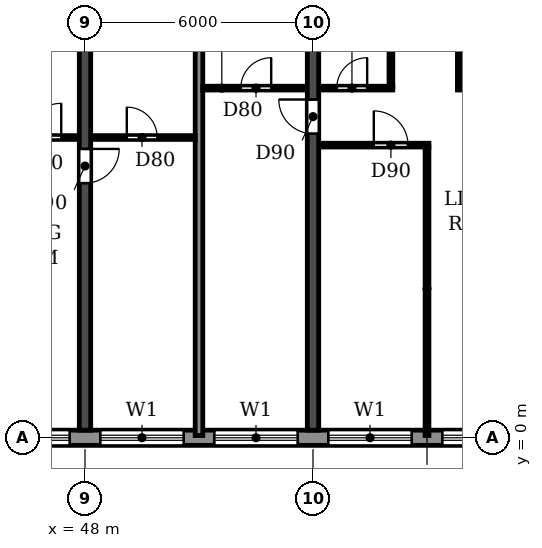
"""IFC4 building model, lengths in metres.
Left out: names, types, materials, properties, quantities, classifications, styles, units other than length and angle.
Written with IfcOpenShell. Run it as: python <this file> out.ifc"""

import sys

from ifc_helpers import new_model, si_unit, direction, frame, frame_2d, origin, place, context, subcontext, project, spatial, rectangle, extrude, element, fill, save


model = new_model("IFC4")
c1 = context("Model", 3, precision=1e-05, world=origin(), true_north=direction((0.0, 1.0)))
c2 = subcontext(c1, "Body", "Model", "MODEL_VIEW")
j1 = project(units=[si_unit("LENGTHUNIT", "METRE"), si_unit("PLANEANGLEUNIT", "RADIAN")], contexts=[c1])
p1 = place(None, origin())
s1 = spatial("IfcSite", under=j1, at=p1, CompositionType="ELEMENT")
p2 = place(p1, origin())
s2 = spatial("IfcBuilding", under=s1, at=p2, CompositionType="ELEMENT")
p3 = place(p2, frame((0.0, 0.0, 162.0)))
s3 = spatial("IfcBuildingStorey", under=s2, at=p3, CompositionType="ELEMENT", Elevation=162.0)
p4 = place(p3, frame((48.0, 0.2, 0.0), z_axis=(0.0, 0.0, 1.0), x_axis=(0.0, 1.0, 0.0)))
e1 = element("IfcWall", 1, at=p4, inside=s3, PredefinedType="SHEAR", context=c2, shape_type="SweptSolid", body=[
    extrude(rectangle(XDim=11.675, YDim=0.3, at=frame_2d((5.837, 0.0))), origin(), (0.0, 0.0, 1.0), 2.95),
])
p5 = place(p4, frame((6.5, 0.0, 0.0)))
e2 = element("IfcOpeningElement", 2, at=p5, cuts=e1, PredefinedType="OPENING", context=c2, shape_type="SweptSolid", body=[
    extrude(rectangle(XDim=0.9, YDim=2.1, at=frame_2d((0.45, 1.05))), frame((0.0, 0.16, 0.0), z_axis=(0.0, -1.0, 0.0), x_axis=(1.0, 0.0, 0.0)), (0.0, 0.0, 1.0), 0.32),
])
p6 = place(p3, frame((54.0, 0.2, 0.0), z_axis=(0.0, 0.0, 1.0), x_axis=(0.0, 1.0, 0.0)))
e3 = element("IfcWall", 3, at=p6, inside=s3, PredefinedType="SHEAR", context=c2, shape_type="SweptSolid", body=[
    extrude(rectangle(XDim=11.675, YDim=0.3, at=frame_2d((5.837, 0.0))), origin(), (0.0, 0.0, 1.0), 2.95),
])
p7 = place(p6, frame((7.8, 0.0, 0.0)))
e4 = element("IfcOpeningElement", 4, at=p7, cuts=e3, PredefinedType="OPENING", context=c2, shape_type="SweptSolid", body=[
    extrude(rectangle(XDim=0.9, YDim=2.1, at=frame_2d((0.45, 1.05))), frame((0.0, 0.16, 0.0), z_axis=(0.0, -1.0, 0.0), x_axis=(1.0, 0.0, 0.0)), (0.0, 0.0, 1.0), 0.32),
])
p8 = place(p3, frame((22.683, 0.0, 0.0), z_axis=(0.0, 0.0, 1.0), x_axis=(1.0, 0.0, 0.0)))
e5 = element("IfcWall", 5, at=p8, inside=s3, PredefinedType="STANDARD", context=c2, shape_type="SweptSolid", body=[
    extrude(rectangle(XDim=56.634, YDim=0.4, at=frame_2d((28.317, 0.0))), origin(), (0.0, 0.0, 1.0), 2.95),
])
p9 = place(p8, frame((1.717, 0.0, 0.9)))
e6 = element("IfcOpeningElement", 6, at=p9, cuts=e5, PredefinedType="OPENING", context=c2, shape_type="SweptSolid", body=[
    extrude(rectangle(XDim=2.2, YDim=1.5, at=frame_2d((1.1, 0.75))), frame((0.0, 0.21, 0.0), z_axis=(0.0, -1.0, 0.0), x_axis=(1.0, 0.0, 0.0)), (0.0, 0.0, 1.0), 0.42),
])
p10 = place(p8, frame((4.917, 0.0, 0.0)))
e7 = element("IfcOpeningElement", 7, at=p10, cuts=e5, PredefinedType="OPENING", context=c2, shape_type="SweptSolid", body=[
    extrude(rectangle(XDim=1.8, YDim=2.4, at=frame_2d((0.9, 1.2))), frame((0.0, 0.21, 0.0), z_axis=(0.0, -1.0, 0.0), x_axis=(1.0, 0.0, 0.0)), (0.0, 0.0, 1.0), 0.42),
])
p11 = place(p8, frame((7.717, 0.0, 0.9)))
e8 = element("IfcOpeningElement", 8, at=p11, cuts=e5, PredefinedType="OPENING", context=c2, shape_type="SweptSolid", body=[
    extrude(rectangle(XDim=2.2, YDim=1.5, at=frame_2d((1.1, 0.75))), frame((0.0, 0.21, 0.0), z_axis=(0.0, -1.0, 0.0), x_axis=(1.0, 0.0, 0.0)), (0.0, 0.0, 1.0), 0.42),
])
p12 = place(p8, frame((10.717, 0.0, 0.9)))
e9 = element("IfcOpeningElement", 9, at=p12, cuts=e5, PredefinedType="OPENING", context=c2, shape_type="SweptSolid", body=[
    extrude(rectangle(XDim=2.2, YDim=1.5, at=frame_2d((1.1, 0.75))), frame((0.0, 0.21, 0.0), z_axis=(0.0, -1.0, 0.0), x_axis=(1.0, 0.0, 0.0)), (0.0, 0.0, 1.0), 0.42),
])
p13 = place(p8, frame((13.717, 0.0, 0.9)))
e10 = element("IfcOpeningElement", 10, at=p13, cuts=e5, PredefinedType="OPENING", context=c2, shape_type="SweptSolid", body=[
    extrude(rectangle(XDim=2.2, YDim=1.5, at=frame_2d((1.1, 0.75))), frame((0.0, 0.21, 0.0), z_axis=(0.0, -1.0, 0.0), x_axis=(1.0, 0.0, 0.0)), (0.0, 0.0, 1.0), 0.42),
])
p14 = place(p8, frame((16.917, 0.0, 0.0)))
e11 = element("IfcOpeningElement", 11, at=p14, cuts=e5, PredefinedType="OPENING", context=c2, shape_type="SweptSolid", body=[
    extrude(rectangle(XDim=1.8, YDim=2.4, at=frame_2d((0.9, 1.2))), frame((0.0, 0.21, 0.0), z_axis=(0.0, -1.0, 0.0), x_axis=(1.0, 0.0, 0.0)), (0.0, 0.0, 1.0), 0.42),
])
p15 = place(p8, frame((19.717, 0.0, 0.9)))
e12 = element("IfcOpeningElement", 12, at=p15, cuts=e5, PredefinedType="OPENING", context=c2, shape_type="SweptSolid", body=[
    extrude(rectangle(XDim=2.2, YDim=1.5, at=frame_2d((1.1, 0.75))), frame((0.0, 0.21, 0.0), z_axis=(0.0, -1.0, 0.0), x_axis=(1.0, 0.0, 0.0)), (0.0, 0.0, 1.0), 0.42),
])
p16 = place(p8, frame((22.717, 0.0, 0.9)))
e13 = element("IfcOpeningElement", 13, at=p16, cuts=e5, PredefinedType="OPENING", context=c2, shape_type="SweptSolid", body=[
    extrude(rectangle(XDim=2.2, YDim=1.5, at=frame_2d((1.1, 0.75))), frame((0.0, 0.21, 0.0), z_axis=(0.0, -1.0, 0.0), x_axis=(1.0, 0.0, 0.0)), (0.0, 0.0, 1.0), 0.42),
])
p17 = place(p8, frame((25.717, 0.0, 0.9)))
e14 = element("IfcOpeningElement", 14, at=p17, cuts=e5, PredefinedType="OPENING", context=c2, shape_type="SweptSolid", body=[
    extrude(rectangle(XDim=2.2, YDim=1.5, at=frame_2d((1.1, 0.75))), frame((0.0, 0.21, 0.0), z_axis=(0.0, -1.0, 0.0), x_axis=(1.0, 0.0, 0.0)), (0.0, 0.0, 1.0), 0.42),
])
p18 = place(p8, frame((28.717, 0.0, 0.9)))
e15 = element("IfcOpeningElement", 15, at=p18, cuts=e5, PredefinedType="OPENING", context=c2, shape_type="SweptSolid", body=[
    extrude(rectangle(XDim=2.2, YDim=1.5, at=frame_2d((1.1, 0.75))), frame((0.0, 0.21, 0.0), z_axis=(0.0, -1.0, 0.0), x_axis=(1.0, 0.0, 0.0)), (0.0, 0.0, 1.0), 0.42),
])
p19 = place(p8, frame((31.717, 0.0, 0.9)))
e16 = element("IfcOpeningElement", 16, at=p19, cuts=e5, PredefinedType="OPENING", context=c2, shape_type="SweptSolid", body=[
    extrude(rectangle(XDim=2.2, YDim=1.5, at=frame_2d((1.1, 0.75))), frame((0.0, 0.21, 0.0), z_axis=(0.0, -1.0, 0.0), x_axis=(1.0, 0.0, 0.0)), (0.0, 0.0, 1.0), 0.42),
])
p20 = place(p8, frame((34.717, 0.0, 0.9)))
e17 = element("IfcOpeningElement", 17, at=p20, cuts=e5, PredefinedType="OPENING", context=c2, shape_type="SweptSolid", body=[
    extrude(rectangle(XDim=2.2, YDim=1.5, at=frame_2d((1.1, 0.75))), frame((0.0, 0.21, 0.0), z_axis=(0.0, -1.0, 0.0), x_axis=(1.0, 0.0, 0.0)), (0.0, 0.0, 1.0), 0.42),
])
p21 = place(p8, frame((37.717, 0.0, 0.9)))
e18 = element("IfcOpeningElement", 18, at=p21, cuts=e5, PredefinedType="OPENING", context=c2, shape_type="SweptSolid", body=[
    extrude(rectangle(XDim=2.2, YDim=1.5, at=frame_2d((1.1, 0.75))), frame((0.0, 0.21, 0.0), z_axis=(0.0, -1.0, 0.0), x_axis=(1.0, 0.0, 0.0)), (0.0, 0.0, 1.0), 0.42),
])
p22 = place(p8, frame((40.717, 0.0, 0.9)))
e19 = element("IfcOpeningElement", 19, at=p22, cuts=e5, PredefinedType="OPENING", context=c2, shape_type="SweptSolid", body=[
    extrude(rectangle(XDim=2.2, YDim=1.5, at=frame_2d((1.1, 0.75))), frame((0.0, 0.21, 0.0), z_axis=(0.0, -1.0, 0.0), x_axis=(1.0, 0.0, 0.0)), (0.0, 0.0, 1.0), 0.42),
])
p23 = place(p8, frame((43.717, 0.0, 0.9)))
e20 = element("IfcOpeningElement", 20, at=p23, cuts=e5, PredefinedType="OPENING", context=c2, shape_type="SweptSolid", body=[
    extrude(rectangle(XDim=2.2, YDim=1.5, at=frame_2d((1.1, 0.75))), frame((0.0, 0.21, 0.0), z_axis=(0.0, -1.0, 0.0), x_axis=(1.0, 0.0, 0.0)), (0.0, 0.0, 1.0), 0.42),
])
p24 = place(p8, frame((46.717, 0.0, 0.9)))
e21 = element("IfcOpeningElement", 21, at=p24, cuts=e5, PredefinedType="OPENING", context=c2, shape_type="SweptSolid", body=[
    extrude(rectangle(XDim=2.2, YDim=1.5, at=frame_2d((1.1, 0.75))), frame((0.0, 0.21, 0.0), z_axis=(0.0, -1.0, 0.0), x_axis=(1.0, 0.0, 0.0)), (0.0, 0.0, 1.0), 0.42),
])
p25 = place(p8, frame((49.917, 0.0, 0.0)))
e22 = element("IfcOpeningElement", 22, at=p25, cuts=e5, PredefinedType="OPENING", context=c2, shape_type="SweptSolid", body=[
    extrude(rectangle(XDim=1.8, YDim=2.4, at=frame_2d((0.9, 1.2))), frame((0.0, 0.21, 0.0), z_axis=(0.0, -1.0, 0.0), x_axis=(1.0, 0.0, 0.0)), (0.0, 0.0, 1.0), 0.42),
])
p26 = place(p8, frame((52.717, 0.0, 0.9)))
e23 = element("IfcOpeningElement", 23, at=p26, cuts=e5, PredefinedType="OPENING", context=c2, shape_type="SweptSolid", body=[
    extrude(rectangle(XDim=2.2, YDim=1.5, at=frame_2d((1.1, 0.75))), frame((0.0, 0.21, 0.0), z_axis=(0.0, -1.0, 0.0), x_axis=(1.0, 0.0, 0.0)), (0.0, 0.0, 1.0), 0.42),
])
p27 = place(p3, frame((51.0, 0.06, 0.0), z_axis=(0.0, 0.0, 1.0), x_axis=(0.0, 1.0, 0.0)))
e24 = element("IfcWall", 24, at=p27, inside=s3, PredefinedType="PARTITIONING", context=c2, shape_type="SweptSolid", body=[
    extrude(rectangle(XDim=11.805, YDim=0.2, at=frame_2d((5.902, 0.0))), origin(), (0.0, 0.0, 1.0), 2.95),
])
p28 = place(p3, frame((54.16, 7.7, 0.0), z_axis=(0.0, 0.0, 1.0), x_axis=(1.0, 0.0, 0.0)))
e25 = element("IfcWall", 25, at=p28, inside=s3, PredefinedType="PARTITIONING", context=c2, shape_type="SweptSolid", body=[
    extrude(rectangle(XDim=2.89, YDim=0.1, at=frame_2d((1.445, 0.0))), origin(), (0.0, 0.0, 1.0), 2.95),
])
p29 = place(p28, frame((1.44, 0.0, 0.0)))
e26 = element("IfcOpeningElement", 26, at=p29, cuts=e25, PredefinedType="OPENING", context=c2, shape_type="SweptSolid", body=[
    extrude(rectangle(XDim=0.9, YDim=2.1, at=frame_2d((0.45, 1.05))), frame((0.0, 0.06, 0.0), z_axis=(0.0, -1.0, 0.0), x_axis=(1.0, 0.0, 0.0)), (0.0, 0.0, 1.0), 0.12),
])
p30 = place(p3, frame((45.8, 7.9, 0.0), z_axis=(0.0, 0.0, 1.0), x_axis=(1.0, 0.0, 0.0)))
e27 = element("IfcWall", 27, at=p30, inside=s3, PredefinedType="PARTITIONING", context=c2, shape_type="SweptSolid", body=[
    extrude(rectangle(XDim=2.04, YDim=0.1, at=frame_2d((1.02, 0.0))), origin(), (0.0, 0.0, 1.0), 2.95),
])
p31 = place(p30, frame((0.675, 0.0, 0.0)))
e28 = element("IfcOpeningElement", 28, at=p31, cuts=e27, PredefinedType="OPENING", context=c2, shape_type="SweptSolid", body=[
    extrude(rectangle(XDim=0.9, YDim=2.1, at=frame_2d((0.45, 1.05))), frame((0.0, 0.06, 0.0), z_axis=(0.0, -1.0, 0.0), x_axis=(1.0, 0.0, 0.0)), (0.0, 0.0, 1.0), 0.12),
])
p32 = place(p3, frame((48.16, 7.9, 0.0), z_axis=(0.0, 0.0, 1.0), x_axis=(1.0, 0.0, 0.0)))
e29 = element("IfcWall", 29, at=p32, inside=s3, PredefinedType="PARTITIONING", context=c2, shape_type="SweptSolid", body=[
    extrude(rectangle(XDim=2.74, YDim=0.1, at=frame_2d((1.37, 0.0))), origin(), (0.0, 0.0, 1.0), 2.95),
])
p33 = place(p32, frame((0.94, 0.0, 0.0)))
e30 = element("IfcOpeningElement", 30, at=p33, cuts=e29, PredefinedType="OPENING", context=c2, shape_type="SweptSolid", body=[
    extrude(rectangle(XDim=0.8, YDim=2.1, at=frame_2d((0.4, 1.05))), frame((0.0, 0.06, 0.0), z_axis=(0.0, -1.0, 0.0), x_axis=(1.0, 0.0, 0.0)), (0.0, 0.0, 1.0), 0.12),
])
p34 = place(p3, frame((51.1, 9.2, 0.0), z_axis=(0.0, 0.0, 1.0), x_axis=(1.0, 0.0, 0.0)))
e31 = element("IfcWall", 31, at=p34, inside=s3, PredefinedType="PARTITIONING", context=c2, shape_type="SweptSolid", body=[
    extrude(rectangle(XDim=2.74, YDim=0.1, at=frame_2d((1.37, 0.0))), origin(), (0.0, 0.0, 1.0), 2.95),
])
p35 = place(p34, frame((1.0, 0.0, 0.0)))
e32 = element("IfcOpeningElement", 32, at=p35, cuts=e31, PredefinedType="OPENING", context=c2, shape_type="SweptSolid", body=[
    extrude(rectangle(XDim=0.8, YDim=2.1, at=frame_2d((0.4, 1.05))), frame((0.0, 0.06, 0.0), z_axis=(0.0, -1.0, 0.0), x_axis=(1.0, 0.0, 0.0)), (0.0, 0.0, 1.0), 0.12),
])
p36 = place(p3, frame((54.16, 9.2, 0.0), z_axis=(0.0, 0.0, 1.0), x_axis=(1.0, 0.0, 0.0)))
e33 = element("IfcWall", 33, at=p36, inside=s3, PredefinedType="PARTITIONING", context=c2, shape_type="SweptSolid", body=[
    extrude(rectangle(XDim=1.94, YDim=0.1, at=frame_2d((0.97, 0.0))), origin(), (0.0, 0.0, 1.0), 2.95),
])
p37 = place(p36, frame((0.465, 0.0, 0.0)))
e34 = element("IfcOpeningElement", 34, at=p37, cuts=e33, PredefinedType="OPENING", context=c2, shape_type="SweptSolid", body=[
    extrude(rectangle(XDim=0.8, YDim=2.1, at=frame_2d((0.4, 1.05))), frame((0.0, 0.06, 0.0), z_axis=(0.0, -1.0, 0.0), x_axis=(1.0, 0.0, 0.0)), (0.0, 0.0, 1.0), 0.12),
])
p38 = place(p3, frame((57.8, 9.2, 0.0), z_axis=(0.0, 0.0, 1.0), x_axis=(1.0, 0.0, 0.0)))
e35 = element("IfcWall", 35, at=p38, inside=s3, PredefinedType="PARTITIONING", context=c2, shape_type="SweptSolid", body=[
    extrude(rectangle(XDim=2.04, YDim=0.1, at=frame_2d((1.02, 0.0))), origin(), (0.0, 0.0, 1.0), 2.95),
])
p39 = place(p38, frame((0.675, 0.0, 0.0)))
e36 = element("IfcOpeningElement", 36, at=p39, cuts=e35, PredefinedType="OPENING", context=c2, shape_type="SweptSolid", body=[
    extrude(rectangle(XDim=0.9, YDim=2.1, at=frame_2d((0.45, 1.05))), frame((0.0, 0.06, 0.0), z_axis=(0.0, -1.0, 0.0), x_axis=(1.0, 0.0, 0.0)), (0.0, 0.0, 1.0), 0.12),
])
p40 = place(p3, frame((56.05, 9.25, 0.0), z_axis=(0.0, 0.0, 1.0), x_axis=(0.0, 1.0, 0.0)))
e37 = element("IfcWall", 37, at=p40, inside=s3, PredefinedType="PARTITIONING", context=c2, shape_type="SweptSolid", body=[
    extrude(rectangle(XDim=2.615, YDim=0.1, at=frame_2d((1.308, 0.0))), origin(), (0.0, 0.0, 1.0), 2.95),
])
p41 = place(p3, frame((57.0, 0.06, 0.0), z_axis=(0.0, 0.0, 1.0), x_axis=(0.0, 1.0, 0.0)))
e38 = element("IfcWall", 38, at=p41, inside=s3, PredefinedType="PARTITIONING", context=c2, shape_type="SweptSolid", body=[
    extrude(rectangle(XDim=7.59, YDim=0.1, at=frame_2d((3.795, 0.0))), origin(), (0.0, 0.0, 1.0), 2.95),
])
p42 = place(p3, frame((57.85, 9.25, 0.0), z_axis=(0.0, 0.0, 1.0), x_axis=(0.0, 1.0, 0.0)))
e39 = element("IfcWall", 39, at=p42, inside=s3, PredefinedType="PARTITIONING", context=c2, shape_type="SweptSolid", body=[
    extrude(rectangle(XDim=2.615, YDim=0.1, at=frame_2d((1.308, 0.0))), origin(), (0.0, 0.0, 1.0), 2.95),
])
p43 = place(p16, origin())
e40 = element("IfcWindow", 40, at=p43, inside=s3, PartitioningType="DOUBLE_PANEL_HORIZONTAL", PredefinedType="WINDOW", context=c2, shape_type="SweptSolid", body=[
    extrude(rectangle(XDim=2.2, YDim=1.5, at=frame_2d((1.1, 0.75))), frame((0.0, 0.03, 0.0), z_axis=(0.0, -1.0, 0.0), x_axis=(1.0, 0.0, 0.0)), (0.0, 0.0, 1.0), 0.06),
])
fill(e13, e40)
p44 = place(p17, origin())
e41 = element("IfcWindow", 41, at=p44, inside=s3, PartitioningType="DOUBLE_PANEL_HORIZONTAL", PredefinedType="WINDOW", context=c2, shape_type="SweptSolid", body=[
    extrude(rectangle(XDim=2.2, YDim=1.5, at=frame_2d((1.1, 0.75))), frame((0.0, 0.03, 0.0), z_axis=(0.0, -1.0, 0.0), x_axis=(1.0, 0.0, 0.0)), (0.0, 0.0, 1.0), 0.06),
])
fill(e14, e41)
p45 = place(p18, origin())
e42 = element("IfcWindow", 42, at=p45, inside=s3, PartitioningType="DOUBLE_PANEL_HORIZONTAL", PredefinedType="WINDOW", context=c2, shape_type="SweptSolid", body=[
    extrude(rectangle(XDim=2.2, YDim=1.5, at=frame_2d((1.1, 0.75))), frame((0.0, 0.03, 0.0), z_axis=(0.0, -1.0, 0.0), x_axis=(1.0, 0.0, 0.0)), (0.0, 0.0, 1.0), 0.06),
])
fill(e15, e42)
p46 = place(p19, origin())
e43 = element("IfcWindow", 43, at=p46, inside=s3, PartitioningType="DOUBLE_PANEL_HORIZONTAL", PredefinedType="WINDOW", context=c2, shape_type="SweptSolid", body=[
    extrude(rectangle(XDim=2.2, YDim=1.5, at=frame_2d((1.1, 0.75))), frame((0.0, 0.03, 0.0), z_axis=(0.0, -1.0, 0.0), x_axis=(1.0, 0.0, 0.0)), (0.0, 0.0, 1.0), 0.06),
])
fill(e16, e43)
p47 = place(p20, origin())
e44 = element("IfcWindow", 44, at=p47, inside=s3, PartitioningType="DOUBLE_PANEL_HORIZONTAL", PredefinedType="WINDOW", context=c2, shape_type="SweptSolid", body=[
    extrude(rectangle(XDim=2.2, YDim=1.5, at=frame_2d((1.1, 0.75))), frame((0.0, 0.03, 0.0), z_axis=(0.0, -1.0, 0.0), x_axis=(1.0, 0.0, 0.0)), (0.0, 0.0, 1.0), 0.06),
])
fill(e17, e44)
p48 = place(p33, origin())
e45 = element("IfcDoor", 45, at=p48, inside=s3, OperationType="SINGLE_SWING_LEFT", PredefinedType="DOOR", context=c2, shape_type="SweptSolid", body=[
    extrude(rectangle(XDim=0.8, YDim=2.1, at=frame_2d((0.4, 1.05))), frame((0.0, 0.025, 0.0), z_axis=(0.0, -1.0, 0.0), x_axis=(1.0, 0.0, 0.0)), (0.0, 0.0, 1.0), 0.05),
])
fill(e30, e45)
p49 = place(p31, origin())
e46 = element("IfcDoor", 46, at=p49, inside=s3, OperationType="SINGLE_SWING_RIGHT", PredefinedType="DOOR", context=c2, shape_type="SweptSolid", body=[
    extrude(rectangle(XDim=0.9, YDim=2.1, at=frame_2d((0.45, 1.05))), frame((0.0, 0.025, 0.0), z_axis=(0.0, -1.0, 0.0), x_axis=(1.0, 0.0, 0.0)), (0.0, 0.0, 1.0), 0.05),
])
fill(e28, e46)
p50 = place(p5, frame((0.9, 0.0, 0.0), z_axis=(0.0, 0.0, 1.0), x_axis=(-1.0, 0.0, 0.0)))
e47 = element("IfcDoor", 47, at=p50, inside=s3, OperationType="SINGLE_SWING_LEFT", PredefinedType="DOOR", context=c2, shape_type="SweptSolid", body=[
    extrude(rectangle(XDim=0.9, YDim=2.1, at=frame_2d((0.45, 1.05))), frame((0.0, 0.025, 0.0), z_axis=(0.0, -1.0, 0.0), x_axis=(1.0, 0.0, 0.0)), (0.0, 0.0, 1.0), 0.05),
])
fill(e2, e47)
p51 = place(p35, origin())
e48 = element("IfcDoor", 48, at=p51, inside=s3, OperationType="SINGLE_SWING_RIGHT", PredefinedType="DOOR", context=c2, shape_type="SweptSolid", body=[
    extrude(rectangle(XDim=0.8, YDim=2.1, at=frame_2d((0.4, 1.05))), frame((0.0, 0.025, 0.0), z_axis=(0.0, -1.0, 0.0), x_axis=(1.0, 0.0, 0.0)), (0.0, 0.0, 1.0), 0.05),
])
fill(e32, e48)
p52 = place(p7, origin())
e49 = element("IfcDoor", 49, at=p52, inside=s3, OperationType="SINGLE_SWING_RIGHT", PredefinedType="DOOR", context=c2, shape_type="SweptSolid", body=[
    extrude(rectangle(XDim=0.9, YDim=2.1, at=frame_2d((0.45, 1.05))), frame((0.0, 0.025, 0.0), z_axis=(0.0, -1.0, 0.0), x_axis=(1.0, 0.0, 0.0)), (0.0, 0.0, 1.0), 0.05),
])
fill(e4, e49)
p53 = place(p37, origin())
e50 = element("IfcDoor", 50, at=p53, inside=s3, OperationType="SINGLE_SWING_RIGHT", PredefinedType="DOOR", context=c2, shape_type="SweptSolid", body=[
    extrude(rectangle(XDim=0.8, YDim=2.1, at=frame_2d((0.4, 1.05))), frame((0.0, 0.025, 0.0), z_axis=(0.0, -1.0, 0.0), x_axis=(1.0, 0.0, 0.0)), (0.0, 0.0, 1.0), 0.05),
])
fill(e34, e50)
p54 = place(p29, origin())
e51 = element("IfcDoor", 51, at=p54, inside=s3, OperationType="SINGLE_SWING_LEFT", PredefinedType="DOOR", context=c2, shape_type="SweptSolid", body=[
    extrude(rectangle(XDim=0.9, YDim=2.1, at=frame_2d((0.45, 1.05))), frame((0.0, 0.025, 0.0), z_axis=(0.0, -1.0, 0.0), x_axis=(1.0, 0.0, 0.0)), (0.0, 0.0, 1.0), 0.05),
])
fill(e26, e51)
save(model, sys.argv[1])
